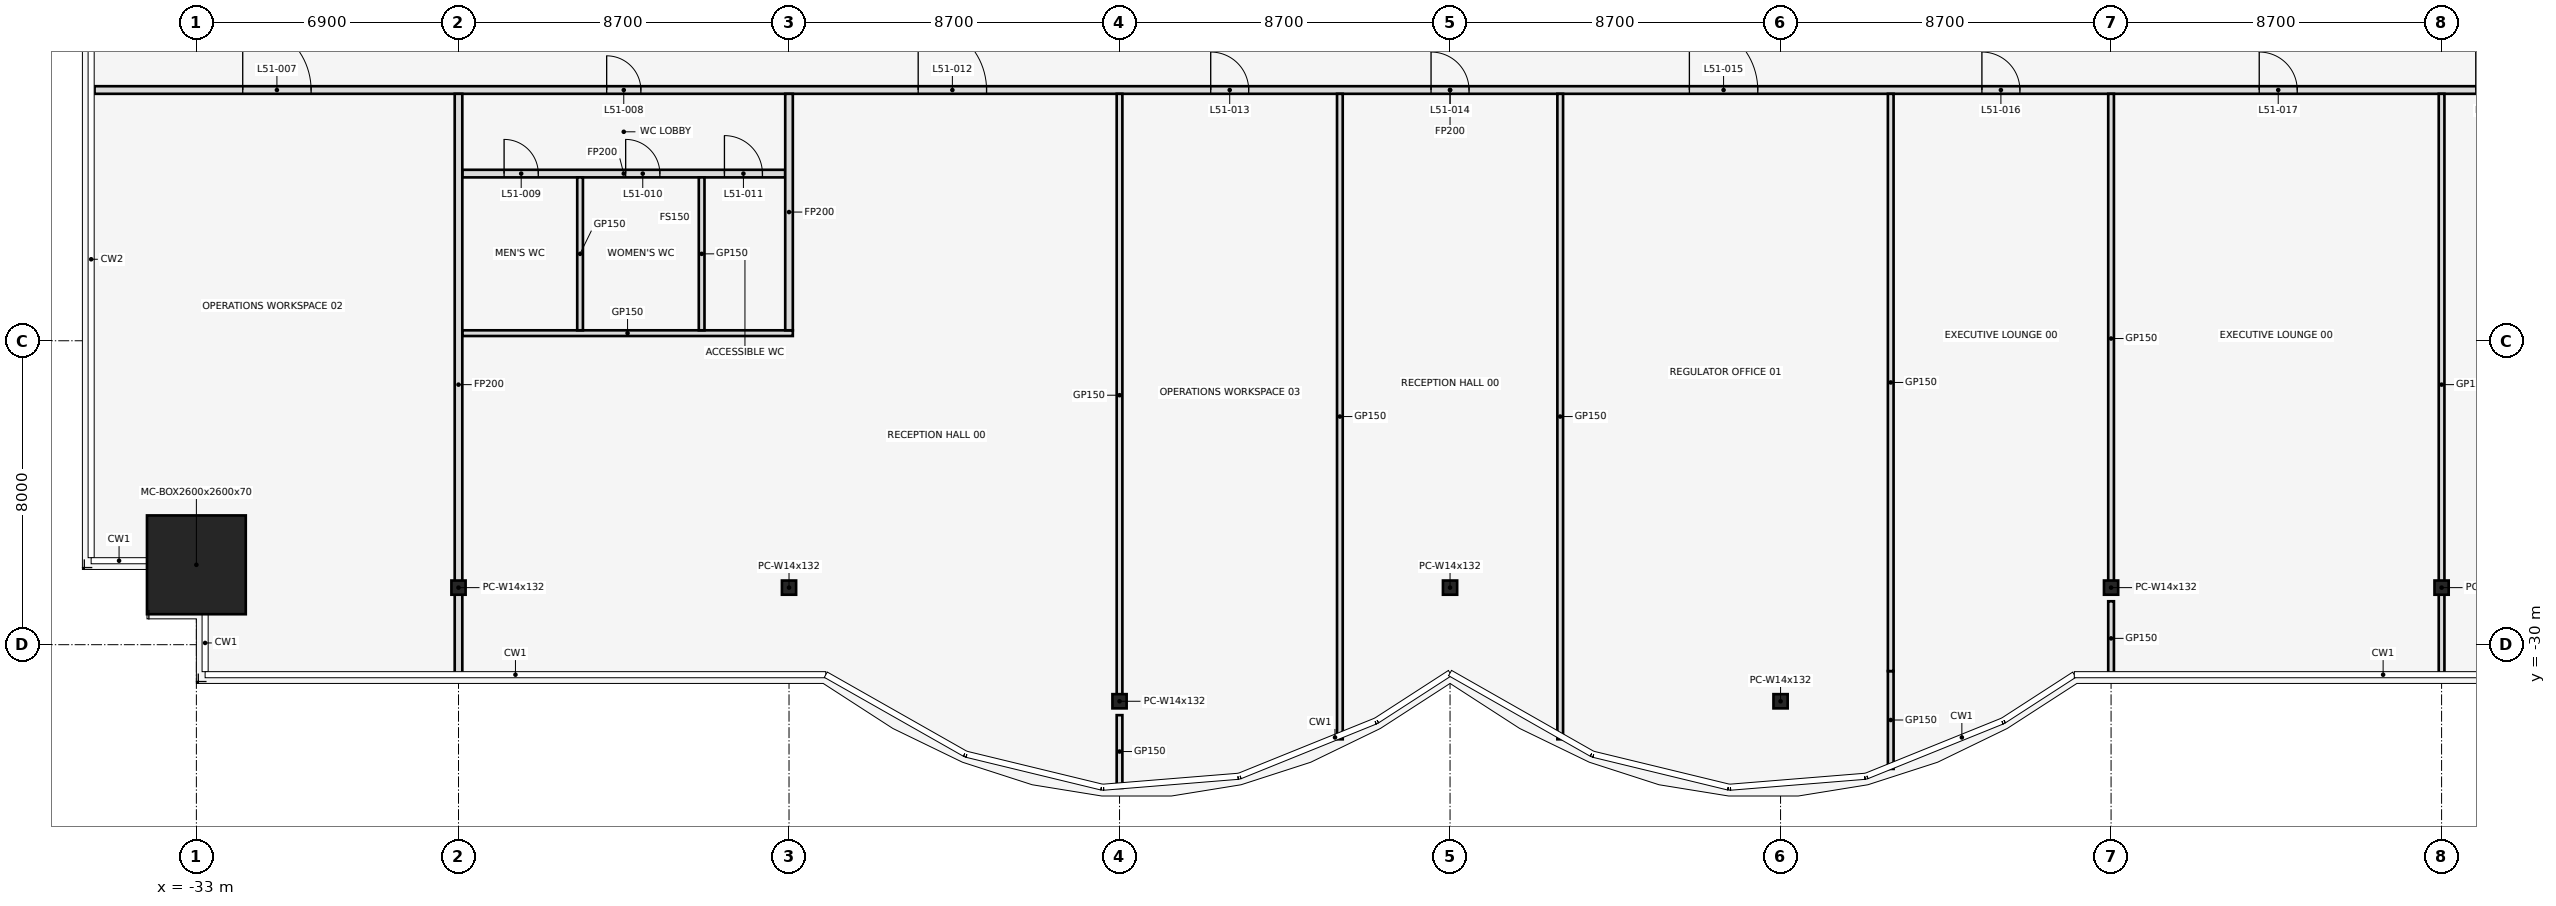
"""IFC4 building model, lengths in metres.
Left out: names, types, materials, properties, quantities, classifications, styles, units other than length and angle.
Written with IfcOpenShell. Run it as: python <this file> out.ifc"""

import sys

from ifc_helpers import new_model, si_unit, direction, frame, frame_2d, origin, origin_2d, place, context, subcontext, project, spatial, rectangle, hollow_rectangle, i_section, extrude, element, fill, save


model = new_model("IFC4")
c1 = context("Model", 3, precision=1e-05, world=origin(), true_north=direction((0.0, 1.0)))
c2 = subcontext(c1, "Body", "Model", "MODEL_VIEW")
j1 = project(units=[si_unit("LENGTHUNIT", "METRE"), si_unit("PLANEANGLEUNIT", "RADIAN")], contexts=[c1])
p1 = place(None, origin())
s1 = spatial("IfcSite", under=j1, at=p1, CompositionType="ELEMENT")
p2 = place(p1, origin())
s2 = spatial("IfcBuilding", under=s1, at=p2, CompositionType="ELEMENT")
p3 = place(p2, frame((0.0, 0.0, 227.8)))
s3 = spatial("IfcBuildingStorey", under=s2, at=p3, CompositionType="ELEMENT", Elevation=227.8)
p4 = place(p3, frame((-33.0, -27.898, 0.0), z_axis=(0.0, 0.0, 1.0), x_axis=(1.0, 0.0, 0.0)))
e1 = element("IfcColumn", 1, at=p4, inside=s3, PredefinedType="COLUMN", context=c2, shape_type="SweptSolid", body=[
    extrude(hollow_rectangle(XDim=2.6, YDim=2.6, WallThickness=0.07, at=origin_2d()), origin(), (0.0, 0.0, 1.0), 4.1),
])
for number, where, z_axis, x_axis in (
    (2, (-26.1, -28.498, 0.0), (0.0, 0.0, 1.0), (1.0, 0.0, 0.0)),
    (3, (-17.4, -28.498, 0.0), (0.0, 0.0, 1.0), (1.0, 0.0, 0.0)),
    (4, (-8.7, -31.489, 0.0), (0.0, 0.0, 1.0), (1.0, 0.0, 0.0)),
    (5, (0.0, -28.498, 0.0), (0.0, 0.0, 1.0), (1.0, 0.0, 0.0)),
    (6, (8.7, -31.489, 0.0), (0.0, 0.0, 1.0), (1.0, 0.0, 0.0)),
    (7, (17.4, -28.498, 0.0), (0.0, 0.0, 1.0), (1.0, 0.0, 0.0)),
    (8, (26.1, -28.498, 0.0), (0.0, 0.0, 1.0), (1.0, 0.0, 0.0)),
):
    element("IfcColumn", number, at=place(p3, frame(where, z_axis=z_axis, x_axis=x_axis)), inside=s3, PredefinedType="COLUMN", context=c2, shape_type="SweptSolid", body=[
        extrude(i_section(OverallWidth=0.373, OverallDepth=0.373, WebThickness=0.016, FlangeThickness=0.026, at=origin_2d()), origin(), (0.0, 0.0, 1.0), 4.1),
    ])
p5 = place(p3, frame((-26.0, -21.8, 0.0), z_axis=(0.0, 0.0, 1.0), x_axis=(1.0, 0.0, 0.0)))
e9 = element("IfcWall", 9, at=p5, inside=s3, PredefinedType="PARTITIONING", context=c2, shape_type="SweptSolid", body=[
    extrude(rectangle(XDim=8.7, YDim=0.15, at=frame_2d((4.35, 0.0))), origin(), (0.0, 0.0, 1.0), 2.84),
])
p6 = place(p3, frame((-26.0, -17.6, 0.0), z_axis=(0.0, 0.0, 1.0), x_axis=(1.0, 0.0, 0.0)))
e10 = element("IfcWall", 10, at=p6, inside=s3, PredefinedType="PARTITIONING", context=c2, shape_type="SweptSolid", body=[
    extrude(rectangle(XDim=8.5, YDim=0.2, at=frame_2d((4.25, 0.0))), origin(), (0.0, 0.0, 1.0), 2.84),
])
p7 = place(p6, frame((1.1, 0.0, 0.0)))
e11 = element("IfcOpeningElement", 11, at=p7, cuts=e10, PredefinedType="OPENING", context=c2, shape_type="SweptSolid", body=[
    extrude(rectangle(XDim=0.9, YDim=2.1, at=frame_2d((0.45, 1.05))), frame((0.0, 0.112, 0.0), z_axis=(0.0, -1.0, 0.0), x_axis=(1.0, 0.0, 0.0)), (0.0, 0.0, 1.0), 0.224),
])
p8 = place(p6, frame((4.3, 0.0, 0.0)))
e12 = element("IfcOpeningElement", 12, at=p8, cuts=e10, PredefinedType="OPENING", context=c2, shape_type="SweptSolid", body=[
    extrude(rectangle(XDim=0.9, YDim=2.1, at=frame_2d((0.45, 1.05))), frame((0.0, 0.112, 0.0), z_axis=(0.0, -1.0, 0.0), x_axis=(1.0, 0.0, 0.0)), (0.0, 0.0, 1.0), 0.224),
])
p9 = place(p6, frame((6.9, 0.0, 0.0)))
e13 = element("IfcOpeningElement", 13, at=p9, cuts=e10, PredefinedType="OPENING", context=c2, shape_type="SweptSolid", body=[
    extrude(rectangle(XDim=1.0, YDim=2.1, at=frame_2d((0.5, 1.05))), frame((0.0, 0.112, 0.0), z_axis=(0.0, -1.0, 0.0), x_axis=(1.0, 0.0, 0.0)), (0.0, 0.0, 1.0), 0.224),
])
p10 = place(p3, frame((-35.68, -15.4, 0.0), z_axis=(0.0, 0.0, 1.0), x_axis=(1.0, 0.0, 0.0)))
e14 = element("IfcWall", 14, at=p10, inside=s3, PredefinedType="PARTITIONING", context=c2, shape_type="SweptSolid", body=[
    extrude(rectangle(XDim=71.36, YDim=0.2, at=frame_2d((35.68, 0.0))), origin(), (0.0, 0.0, 1.0), 2.84),
])
p11 = place(p10, frame((3.9, 0.0, 0.0)))
e15 = element("IfcOpeningElement", 15, at=p11, cuts=e14, PredefinedType="OPENING", context=c2, shape_type="SweptSolid", body=[
    extrude(rectangle(XDim=1.8, YDim=2.1, at=frame_2d((0.9, 1.05))), frame((0.0, 0.112, 0.0), z_axis=(0.0, -1.0, 0.0), x_axis=(1.0, 0.0, 0.0)), (0.0, 0.0, 1.0), 0.224),
])
p12 = place(p10, frame((13.48, 0.0, 0.0)))
e16 = element("IfcOpeningElement", 16, at=p12, cuts=e14, PredefinedType="OPENING", context=c2, shape_type="SweptSolid", body=[
    extrude(rectangle(XDim=0.9, YDim=2.1, at=frame_2d((0.45, 1.05))), frame((0.0, 0.112, 0.0), z_axis=(0.0, -1.0, 0.0), x_axis=(1.0, 0.0, 0.0)), (0.0, 0.0, 1.0), 0.224),
])
p13 = place(p10, frame((21.68, 0.0, 0.0)))
e17 = element("IfcOpeningElement", 17, at=p13, cuts=e14, PredefinedType="OPENING", context=c2, shape_type="SweptSolid", body=[
    extrude(rectangle(XDim=1.8, YDim=2.1, at=frame_2d((0.9, 1.05))), frame((0.0, 0.112, 0.0), z_axis=(0.0, -1.0, 0.0), x_axis=(1.0, 0.0, 0.0)), (0.0, 0.0, 1.0), 0.224),
])
p14 = place(p10, frame((29.38, 0.0, 0.0)))
e18 = element("IfcOpeningElement", 18, at=p14, cuts=e14, PredefinedType="OPENING", context=c2, shape_type="SweptSolid", body=[
    extrude(rectangle(XDim=1.0, YDim=2.1, at=frame_2d((0.5, 1.05))), frame((0.0, 0.112, 0.0), z_axis=(0.0, -1.0, 0.0), x_axis=(1.0, 0.0, 0.0)), (0.0, 0.0, 1.0), 0.224),
])
p15 = place(p10, frame((35.18, 0.0, 0.0)))
e19 = element("IfcOpeningElement", 19, at=p15, cuts=e14, PredefinedType="OPENING", context=c2, shape_type="SweptSolid", body=[
    extrude(rectangle(XDim=1.0, YDim=2.1, at=frame_2d((0.5, 1.05))), frame((0.0, 0.112, 0.0), z_axis=(0.0, -1.0, 0.0), x_axis=(1.0, 0.0, 0.0)), (0.0, 0.0, 1.0), 0.224),
])
p16 = place(p10, frame((41.98, 0.0, 0.0)))
e20 = element("IfcOpeningElement", 20, at=p16, cuts=e14, PredefinedType="OPENING", context=c2, shape_type="SweptSolid", body=[
    extrude(rectangle(XDim=1.8, YDim=2.1, at=frame_2d((0.9, 1.05))), frame((0.0, 0.112, 0.0), z_axis=(0.0, -1.0, 0.0), x_axis=(1.0, 0.0, 0.0)), (0.0, 0.0, 1.0), 0.224),
])
p17 = place(p10, frame((49.68, 0.0, 0.0)))
e21 = element("IfcOpeningElement", 21, at=p17, cuts=e14, PredefinedType="OPENING", context=c2, shape_type="SweptSolid", body=[
    extrude(rectangle(XDim=1.0, YDim=2.1, at=frame_2d((0.5, 1.05))), frame((0.0, 0.112, 0.0), z_axis=(0.0, -1.0, 0.0), x_axis=(1.0, 0.0, 0.0)), (0.0, 0.0, 1.0), 0.224),
])
p18 = place(p10, frame((56.98, 0.0, 0.0)))
e22 = element("IfcOpeningElement", 22, at=p18, cuts=e14, PredefinedType="OPENING", context=c2, shape_type="SweptSolid", body=[
    extrude(rectangle(XDim=1.0, YDim=2.1, at=frame_2d((0.5, 1.05))), frame((0.0, 0.112, 0.0), z_axis=(0.0, -1.0, 0.0), x_axis=(1.0, 0.0, 0.0)), (0.0, 0.0, 1.0), 0.224),
])
p19 = place(p10, frame((62.68, 0.0, 0.0)))
e23 = element("IfcOpeningElement", 23, at=p19, cuts=e14, PredefinedType="OPENING", context=c2, shape_type="SweptSolid", body=[
    extrude(rectangle(XDim=1.0, YDim=2.1, at=frame_2d((0.5, 1.05))), frame((0.0, 0.112, 0.0), z_axis=(0.0, -1.0, 0.0), x_axis=(1.0, 0.0, 0.0)), (0.0, 0.0, 1.0), 0.224),
])
p20 = place(p10, frame((67.48, 0.0, 0.0)))
e24 = element("IfcOpeningElement", 24, at=p20, cuts=e14, PredefinedType="OPENING", context=c2, shape_type="SweptSolid", body=[
    extrude(rectangle(XDim=1.0, YDim=2.1, at=frame_2d((0.5, 1.05))), frame((0.0, 0.112, 0.0), z_axis=(0.0, -1.0, 0.0), x_axis=(1.0, 0.0, 0.0)), (0.0, 0.0, 1.0), 0.224),
])
p21 = place(p3, frame((-26.1, -30.81, 0.0), z_axis=(0.0, 0.0, 1.0), x_axis=(0.0, 1.0, 0.0)))
e25 = element("IfcWall", 25, at=p21, inside=s3, PredefinedType="PARTITIONING", context=c2, shape_type="SweptSolid", body=[
    extrude(rectangle(XDim=15.31, YDim=0.2, at=frame_2d((7.655, 0.0))), origin(), (0.0, 0.0, 1.0), 2.84),
])
for number, where, z_axis, x_axis in (
    (26, (-22.9, -21.725, 0.0), (0.0, 0.0, 1.0), (0.0, 1.0, 0.0)),
    (27, (-19.7, -21.725, 0.0), (0.0, 0.0, 1.0), (0.0, 1.0, 0.0)),
):
    element("IfcWall", number, at=place(p3, frame(where, z_axis=z_axis, x_axis=x_axis)), inside=s3, PredefinedType="PARTITIONING", context=c2, shape_type="SweptSolid", body=[
        extrude(rectangle(XDim=4.025, YDim=0.15, at=frame_2d((2.013, 0.0))), origin(), (0.0, 0.0, 1.0), 2.84),
    ])
p22 = place(p3, frame((-17.4, -21.725, 0.0), z_axis=(0.0, 0.0, 1.0), x_axis=(0.0, 1.0, 0.0)))
e28 = element("IfcWall", 28, at=p22, inside=s3, PredefinedType="PARTITIONING", context=c2, shape_type="SweptSolid", body=[
    extrude(rectangle(XDim=6.225, YDim=0.2, at=frame_2d((3.113, 0.0))), origin(), (0.0, 0.0, 1.0), 2.84),
])
p23 = place(p3, frame((-8.7, -33.77, 0.0), z_axis=(0.0, 0.0, 1.0), x_axis=(0.0, 1.0, 0.0)))
e29 = element("IfcWall", 29, at=p23, inside=s3, PredefinedType="PARTITIONING", context=c2, shape_type="SweptSolid", body=[
    extrude(rectangle(XDim=1.915, YDim=0.15, at=frame_2d((0.958, 0.0))), origin(), (0.0, 0.0, 1.0), 2.84),
])
p24 = place(p3, frame((-8.7, -31.367, 0.0), z_axis=(0.0, 0.0, 1.0), x_axis=(0.0, 1.0, 0.0)))
e30 = element("IfcWall", 30, at=p24, inside=s3, PredefinedType="PARTITIONING", context=c2, shape_type="SweptSolid", body=[
    extrude(rectangle(XDim=15.867, YDim=0.15, at=frame_2d((7.934, 0.0))), origin(), (0.0, 0.0, 1.0), 2.84),
])
for number, where, z_axis, x_axis in (
    (31, (-2.9, -32.49, 0.0), (0.0, 0.0, 1.0), (0.0, 1.0, 0.0)),
    (32, (2.9, -32.49, 0.0), (0.0, 0.0, 1.0), (0.0, 1.0, 0.0)),
):
    element("IfcWall", number, at=place(p3, frame(where, z_axis=z_axis, x_axis=x_axis)), inside=s3, PredefinedType="PARTITIONING", context=c2, shape_type="SweptSolid", body=[
        extrude(rectangle(XDim=16.99, YDim=0.15, at=frame_2d((8.495, 0.0))), origin(), (0.0, 0.0, 1.0), 2.84),
    ])
p25 = place(p3, frame((11.6, -33.27, 0.0), z_axis=(0.0, 0.0, 1.0), x_axis=(0.0, 1.0, 0.0)))
e33 = element("IfcWall", 33, at=p25, inside=s3, PredefinedType="PARTITIONING", context=c2, shape_type="SweptSolid", body=[
    extrude(rectangle(XDim=2.575, YDim=0.15, at=frame_2d((1.287, 0.0))), origin(), (0.0, 0.0, 1.0), 2.84),
])
p26 = place(p3, frame((11.6, -30.695, 0.0), z_axis=(0.0, 0.0, 1.0), x_axis=(0.0, 1.0, 0.0)))
e34 = element("IfcWall", 34, at=p26, inside=s3, PredefinedType="PARTITIONING", context=c2, shape_type="SweptSolid", body=[
    extrude(rectangle(XDim=15.195, YDim=0.15, at=frame_2d((7.598, 0.0))), origin(), (0.0, 0.0, 1.0), 2.84),
])
p27 = place(p3, frame((17.4, -30.81, 0.0), z_axis=(0.0, 0.0, 1.0), x_axis=(0.0, 1.0, 0.0)))
e35 = element("IfcWall", 35, at=p27, inside=s3, PredefinedType="PARTITIONING", context=c2, shape_type="SweptSolid", body=[
    extrude(rectangle(XDim=1.953, YDim=0.15, at=frame_2d((0.976, 0.0))), origin(), (0.0, 0.0, 1.0), 2.84),
])
p28 = place(p3, frame((17.4, -28.383, 0.0), z_axis=(0.0, 0.0, 1.0), x_axis=(0.0, 1.0, 0.0)))
e36 = element("IfcWall", 36, at=p28, inside=s3, PredefinedType="PARTITIONING", context=c2, shape_type="SweptSolid", body=[
    extrude(rectangle(XDim=12.883, YDim=0.15, at=frame_2d((6.441, 0.0))), origin(), (0.0, 0.0, 1.0), 2.84),
])
p29 = place(p3, frame((26.1, -30.81, 0.0), z_axis=(0.0, 0.0, 1.0), x_axis=(0.0, 1.0, 0.0)))
e37 = element("IfcWall", 37, at=p29, inside=s3, PredefinedType="PARTITIONING", context=c2, shape_type="SweptSolid", body=[
    extrude(rectangle(XDim=15.31, YDim=0.15, at=frame_2d((7.655, 0.0))), origin(), (0.0, 0.0, 1.0), 2.84),
])
p30 = place(p11, origin())
e38 = element("IfcDoor", 38, at=p30, inside=s3, OperationType="SINGLE_SWING_LEFT", PredefinedType="DOOR", context=c2, shape_type="SweptSolid", body=[
    extrude(rectangle(XDim=1.8, YDim=2.1, at=frame_2d((0.9, 1.05))), frame((0.0, 0.025, 0.0), z_axis=(0.0, -1.0, 0.0), x_axis=(1.0, 0.0, 0.0)), (0.0, 0.0, 1.0), 0.05),
])
fill(e15, e38)
p31 = place(p12, frame((0.9, 0.0, 0.0), z_axis=(0.0, 0.0, 1.0), x_axis=(-1.0, 0.0, 0.0)))
e39 = element("IfcDoor", 39, at=p31, inside=s3, OperationType="SINGLE_SWING_RIGHT", PredefinedType="DOOR", context=c2, shape_type="SweptSolid", body=[
    extrude(rectangle(XDim=0.9, YDim=2.1, at=frame_2d((0.45, 1.05))), frame((0.0, 0.025, 0.0), z_axis=(0.0, -1.0, 0.0), x_axis=(1.0, 0.0, 0.0)), (0.0, 0.0, 1.0), 0.05),
])
fill(e16, e39)
p32 = place(p7, frame((0.9, 0.0, 0.0), z_axis=(0.0, 0.0, 1.0), x_axis=(-1.0, 0.0, 0.0)))
e40 = element("IfcDoor", 40, at=p32, inside=s3, OperationType="SINGLE_SWING_RIGHT", PredefinedType="DOOR", context=c2, shape_type="SweptSolid", body=[
    extrude(rectangle(XDim=0.9, YDim=2.1, at=frame_2d((0.45, 1.05))), frame((0.0, 0.025, 0.0), z_axis=(0.0, -1.0, 0.0), x_axis=(1.0, 0.0, 0.0)), (0.0, 0.0, 1.0), 0.05),
])
fill(e11, e40)
p33 = place(p8, frame((0.9, 0.0, 0.0), z_axis=(0.0, 0.0, 1.0), x_axis=(-1.0, 0.0, 0.0)))
e41 = element("IfcDoor", 41, at=p33, inside=s3, OperationType="SINGLE_SWING_LEFT", PredefinedType="DOOR", context=c2, shape_type="SweptSolid", body=[
    extrude(rectangle(XDim=0.9, YDim=2.1, at=frame_2d((0.45, 1.05))), frame((0.0, 0.025, 0.0), z_axis=(0.0, -1.0, 0.0), x_axis=(1.0, 0.0, 0.0)), (0.0, 0.0, 1.0), 0.05),
])
fill(e12, e41)
p34 = place(p9, frame((1.0, 0.0, 0.0), z_axis=(0.0, 0.0, 1.0), x_axis=(-1.0, 0.0, 0.0)))
e42 = element("IfcDoor", 42, at=p34, inside=s3, OperationType="SINGLE_SWING_RIGHT", PredefinedType="DOOR", context=c2, shape_type="SweptSolid", body=[
    extrude(rectangle(XDim=1.0, YDim=2.1, at=frame_2d((0.5, 1.05))), frame((0.0, 0.025, 0.0), z_axis=(0.0, -1.0, 0.0), x_axis=(1.0, 0.0, 0.0)), (0.0, 0.0, 1.0), 0.05),
])
fill(e13, e42)
p35 = place(p13, origin())
e43 = element("IfcDoor", 43, at=p35, inside=s3, OperationType="SINGLE_SWING_LEFT", PredefinedType="DOOR", context=c2, shape_type="SweptSolid", body=[
    extrude(rectangle(XDim=1.8, YDim=2.1, at=frame_2d((0.9, 1.05))), frame((0.0, 0.025, 0.0), z_axis=(0.0, -1.0, 0.0), x_axis=(1.0, 0.0, 0.0)), (0.0, 0.0, 1.0), 0.05),
])
fill(e17, e43)
p36 = place(p14, frame((1.0, 0.0, 0.0), z_axis=(0.0, 0.0, 1.0), x_axis=(-1.0, 0.0, 0.0)))
e44 = element("IfcDoor", 44, at=p36, inside=s3, OperationType="SINGLE_SWING_LEFT", PredefinedType="DOOR", context=c2, shape_type="SweptSolid", body=[
    extrude(rectangle(XDim=1.0, YDim=2.1, at=frame_2d((0.5, 1.05))), frame((0.0, 0.025, 0.0), z_axis=(0.0, -1.0, 0.0), x_axis=(1.0, 0.0, 0.0)), (0.0, 0.0, 1.0), 0.05),
])
fill(e18, e44)
p37 = place(p15, frame((1.0, 0.0, 0.0), z_axis=(0.0, 0.0, 1.0), x_axis=(-1.0, 0.0, 0.0)))
e45 = element("IfcDoor", 45, at=p37, inside=s3, OperationType="SINGLE_SWING_RIGHT", PredefinedType="DOOR", context=c2, shape_type="SweptSolid", body=[
    extrude(rectangle(XDim=1.0, YDim=2.1, at=frame_2d((0.5, 1.05))), frame((0.0, 0.025, 0.0), z_axis=(0.0, -1.0, 0.0), x_axis=(1.0, 0.0, 0.0)), (0.0, 0.0, 1.0), 0.05),
])
fill(e19, e45)
p38 = place(p16, origin())
e46 = element("IfcDoor", 46, at=p38, inside=s3, OperationType="SINGLE_SWING_LEFT", PredefinedType="DOOR", context=c2, shape_type="SweptSolid", body=[
    extrude(rectangle(XDim=1.8, YDim=2.1, at=frame_2d((0.9, 1.05))), frame((0.0, 0.025, 0.0), z_axis=(0.0, -1.0, 0.0), x_axis=(1.0, 0.0, 0.0)), (0.0, 0.0, 1.0), 0.05),
])
fill(e20, e46)
p39 = place(p17, frame((1.0, 0.0, 0.0), z_axis=(0.0, 0.0, 1.0), x_axis=(-1.0, 0.0, 0.0)))
e47 = element("IfcDoor", 47, at=p39, inside=s3, OperationType="SINGLE_SWING_LEFT", PredefinedType="DOOR", context=c2, shape_type="SweptSolid", body=[
    extrude(rectangle(XDim=1.0, YDim=2.1, at=frame_2d((0.5, 1.05))), frame((0.0, 0.025, 0.0), z_axis=(0.0, -1.0, 0.0), x_axis=(1.0, 0.0, 0.0)), (0.0, 0.0, 1.0), 0.05),
])
fill(e21, e47)
p40 = place(p18, frame((1.0, 0.0, 0.0), z_axis=(0.0, 0.0, 1.0), x_axis=(-1.0, 0.0, 0.0)))
e48 = element("IfcDoor", 48, at=p40, inside=s3, OperationType="SINGLE_SWING_RIGHT", PredefinedType="DOOR", context=c2, shape_type="SweptSolid", body=[
    extrude(rectangle(XDim=1.0, YDim=2.1, at=frame_2d((0.5, 1.05))), frame((0.0, 0.025, 0.0), z_axis=(0.0, -1.0, 0.0), x_axis=(1.0, 0.0, 0.0)), (0.0, 0.0, 1.0), 0.05),
])
fill(e22, e48)
p41 = place(p19, frame((1.0, 0.0, 0.0), z_axis=(0.0, 0.0, 1.0), x_axis=(-1.0, 0.0, 0.0)))
e49 = element("IfcDoor", 49, at=p41, inside=s3, OperationType="SINGLE_SWING_RIGHT", PredefinedType="DOOR", context=c2, shape_type="SweptSolid", body=[
    extrude(rectangle(XDim=1.0, YDim=2.1, at=frame_2d((0.5, 1.05))), frame((0.0, 0.025, 0.0), z_axis=(0.0, -1.0, 0.0), x_axis=(1.0, 0.0, 0.0)), (0.0, 0.0, 1.0), 0.05),
])
fill(e23, e49)
save(model, sys.argv[1])
